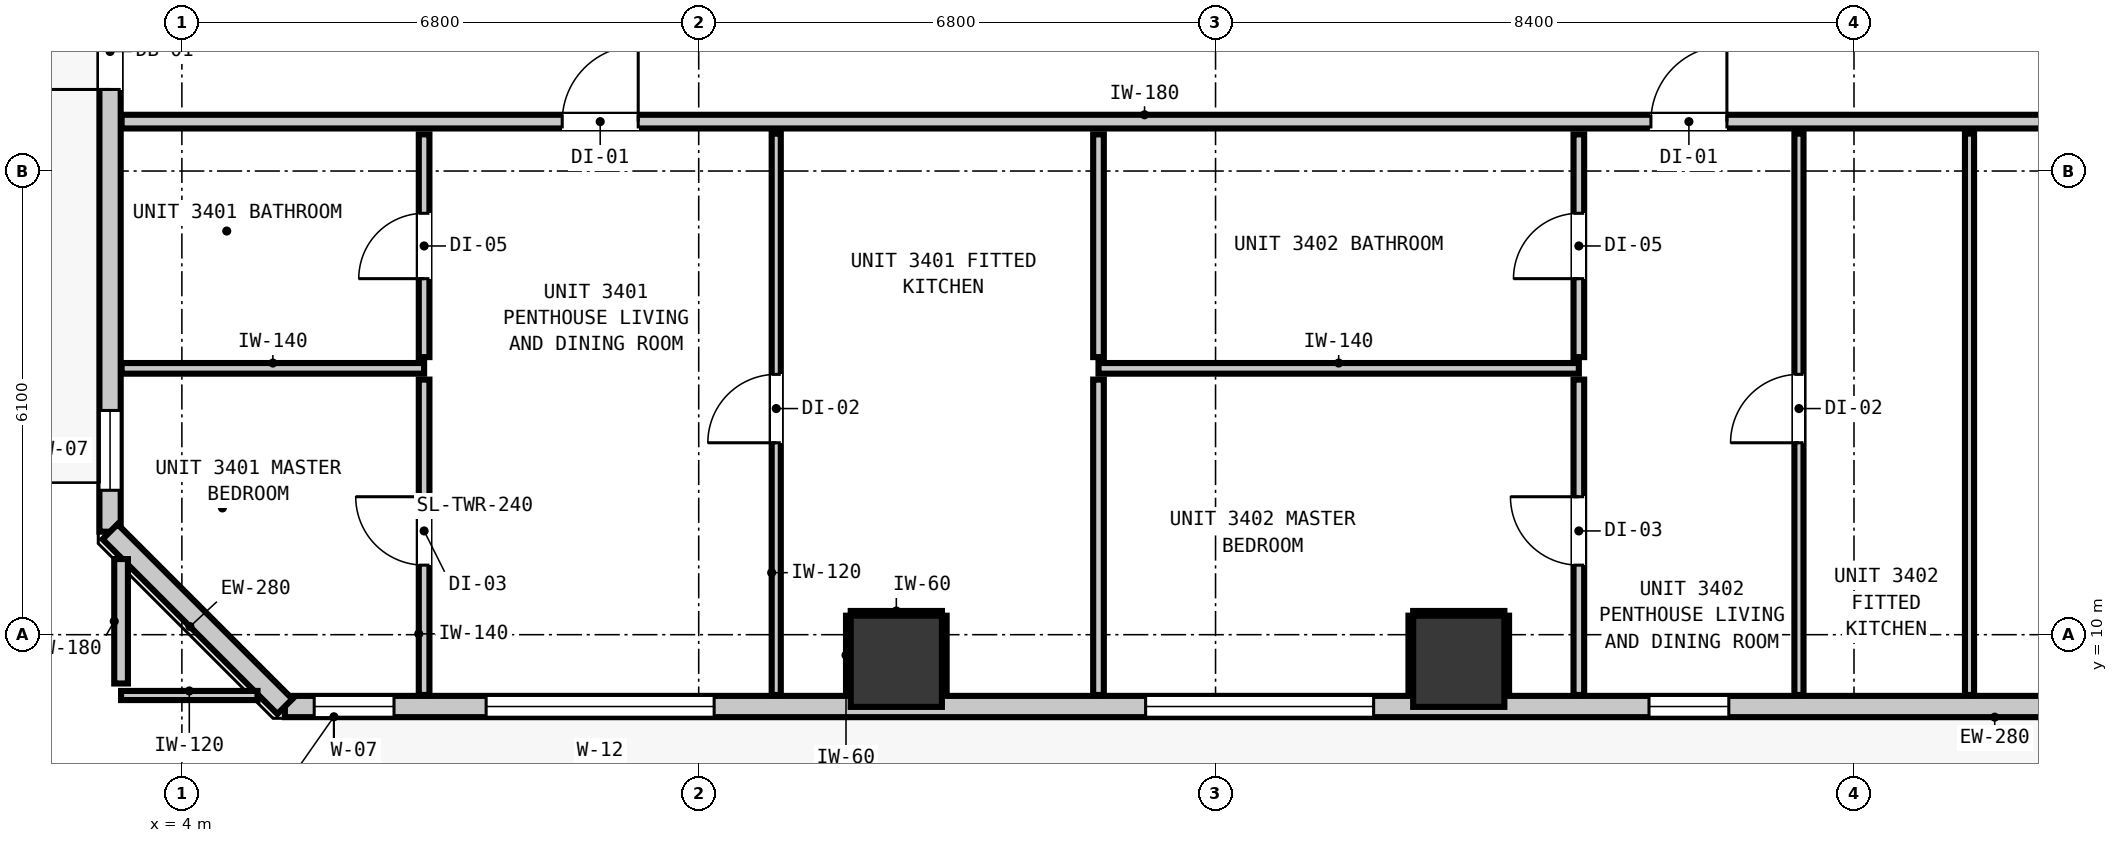
"""IFC4 building model, lengths in metres.
Left out: names, types, materials, properties, quantities, classifications, styles, units other than length and angle.
Written with IfcOpenShell. Run it as: python <this file> out.ifc"""

import sys

from ifc_helpers import new_model, si_unit, direction, frame, frame_2d, origin, origin_2d, place, context, subcontext, project, spatial, rectangle, extrude, element, fill, save


model = new_model("IFC4")
c1 = context("Model", 3, precision=1e-05, world=origin(), true_north=direction((0.0, 1.0)))
c2 = subcontext(c1, "Body", "Model", "MODEL_VIEW")
j1 = project(units=[si_unit("LENGTHUNIT", "METRE"), si_unit("PLANEANGLEUNIT", "RADIAN")], contexts=[c1])
p1 = place(None, origin())
s1 = spatial("IfcSite", under=j1, at=p1, CompositionType="ELEMENT")
p2 = place(p1, origin())
s2 = spatial("IfcBuilding", under=s1, at=p2, CompositionType="ELEMENT")
p3 = place(p2, frame((0.0, 0.0, 119.36)))
s3 = spatial("IfcBuildingStorey", under=s2, at=p3, CompositionType="ELEMENT", Elevation=119.36)
for number, where, z_axis, x_axis in (
    (1, (13.4, 9.65, 0.0), (0.0, 0.0, 1.0), (1.0, 0.0, 0.0)),
    (2, (20.8, 9.65, 0.0), (0.0, 0.0, 1.0), (1.0, 0.0, 0.0)),
):
    element("IfcColumn", number, at=place(p3, frame(where, z_axis=z_axis, x_axis=x_axis)), inside=s3, PredefinedType="COLUMN", context=c2, shape_type="SweptSolid", body=[
        extrude(rectangle(XDim=1.2, YDim=1.2, at=origin_2d()), origin(), (0.0, 0.0, 1.0), 3.32),
    ])
p4 = place(p3, frame((3.055, 11.355, 0.0), z_axis=(0.0, 0.0, 1.0), x_axis=(0.0, 1.0, 0.0)))
e3 = element("IfcWall", 3, at=p4, inside=s3, PredefinedType="STANDARD", context=c2, shape_type="SweptSolid", body=[
    extrude(rectangle(XDim=32.29, YDim=0.28, at=frame_2d((16.145, 0.0))), origin(), (0.0, 0.0, 1.0), 3.08),
])
p5 = place(p4, frame((5.818, 0.0, 0.0)))
e4 = element("IfcOpeningElement", 4, at=p5, cuts=e3, PredefinedType="OPENING", context=c2, shape_type="SweptSolid", body=[
    extrude(rectangle(XDim=1.0, YDim=2.15, at=frame_2d((0.5, 1.075))), frame((0.0, 0.15, 0.0), z_axis=(0.0, -1.0, 0.0), x_axis=(1.0, 0.0, 0.0)), (0.0, 0.0, 1.0), 0.3),
])
p6 = place(p4, frame((0.545, 0.0, 0.85)))
e5 = element("IfcOpeningElement", 5, at=p6, cuts=e3, PredefinedType="OPENING", context=c2, shape_type="SweptSolid", body=[
    extrude(rectangle(XDim=1.05, YDim=1.65, at=frame_2d((0.525, 0.825))), frame((0.0, 0.15, 0.0), z_axis=(0.0, -1.0, 0.0), x_axis=(1.0, 0.0, 0.0)), (0.0, 0.0, 1.0), 0.3),
])
p7 = place(p4, frame((13.495, 0.0, 0.85)))
e6 = element("IfcOpeningElement", 6, at=p7, cuts=e3, PredefinedType="OPENING", context=c2, shape_type="SweptSolid", body=[
    extrude(rectangle(XDim=3.0, YDim=2.1, at=frame_2d((1.5, 1.05))), frame((0.0, 0.15, 0.0), z_axis=(0.0, -1.0, 0.0), x_axis=(1.0, 0.0, 0.0)), (0.0, 0.0, 1.0), 0.3),
])
p8 = place(p3, frame((40.445, 9.055, 0.0), z_axis=(0.0, 0.0, 1.0), x_axis=(-1.0, 0.0, 0.0)))
e7 = element("IfcWall", 7, at=p8, inside=s3, PredefinedType="STANDARD", context=c2, shape_type="SweptSolid", body=[
    extrude(rectangle(XDim=35.09, YDim=0.28, at=frame_2d((17.545, 0.0))), origin(), (0.0, 0.0, 1.0), 3.08),
])
p9 = place(p8, frame((0.904, 0.0, 0.0)))
e8 = element("IfcOpeningElement", 8, at=p9, cuts=e7, PredefinedType="OPENING", context=c2, shape_type="SweptSolid", body=[
    extrude(rectangle(XDim=1.0, YDim=2.15, at=frame_2d((0.5, 1.075))), frame((0.0, 0.15, 0.0), z_axis=(0.0, -1.0, 0.0), x_axis=(1.0, 0.0, 0.0)), (0.0, 0.0, 1.0), 0.3),
])
p10 = place(p8, frame((29.442, 0.0, 0.85)))
e9 = element("IfcOpeningElement", 9, at=p10, cuts=e7, PredefinedType="OPENING", context=c2, shape_type="SweptSolid", body=[
    extrude(rectangle(XDim=3.0, YDim=2.1, at=frame_2d((1.5, 1.05))), frame((0.0, 0.15, 0.0), z_axis=(0.0, -1.0, 0.0), x_axis=(1.0, 0.0, 0.0)), (0.0, 0.0, 1.0), 0.3),
])
p11 = place(p8, frame((33.654, 0.0, 0.85)))
e10 = element("IfcOpeningElement", 10, at=p11, cuts=e7, PredefinedType="OPENING", context=c2, shape_type="SweptSolid", body=[
    extrude(rectangle(XDim=1.05, YDim=1.65, at=frame_2d((0.525, 0.825))), frame((0.0, 0.15, 0.0), z_axis=(0.0, -1.0, 0.0), x_axis=(1.0, 0.0, 0.0)), (0.0, 0.0, 1.0), 0.3),
])
p12 = place(p8, frame((16.092, 0.0, 0.85)))
e11 = element("IfcOpeningElement", 11, at=p12, cuts=e7, PredefinedType="OPENING", context=c2, shape_type="SweptSolid", body=[
    extrude(rectangle(XDim=1.05, YDim=1.65, at=frame_2d((0.525, 0.825))), frame((0.0, 0.15, 0.0), z_axis=(0.0, -1.0, 0.0), x_axis=(1.0, 0.0, 0.0)), (0.0, 0.0, 1.0), 0.3),
])
p13 = place(p8, frame((20.765, 0.0, 0.85)))
e12 = element("IfcOpeningElement", 12, at=p13, cuts=e7, PredefinedType="OPENING", context=c2, shape_type="SweptSolid", body=[
    extrude(rectangle(XDim=3.0, YDim=2.1, at=frame_2d((1.5, 1.05))), frame((0.0, 0.15, 0.0), z_axis=(0.0, -1.0, 0.0), x_axis=(1.0, 0.0, 0.0)), (0.0, 0.0, 1.0), 0.3),
])
p14 = place(p8, frame((6.095, 0.0, 0.85)))
e13 = element("IfcOpeningElement", 13, at=p14, cuts=e7, PredefinedType="OPENING", context=c2, shape_type="SweptSolid", body=[
    extrude(rectangle(XDim=3.0, YDim=2.1, at=frame_2d((1.5, 1.05))), frame((0.0, 0.15, 0.0), z_axis=(0.0, -1.0, 0.0), x_axis=(1.0, 0.0, 0.0)), (0.0, 0.0, 1.0), 0.3),
])
p15 = place(p3, frame((5.355, 9.055, 0.0), z_axis=(0.0, 0.0, 1.0), x_axis=(-0.707106781187, 0.707106781187, 0.0)))
e14 = element("IfcWall", 14, at=p15, inside=s3, PredefinedType="STANDARD", context=c2, shape_type="SweptSolid", body=[
    extrude(rectangle(XDim=3.253, YDim=0.28, at=frame_2d((1.626, 0.0))), origin(), (0.0, 0.0, 1.0), 3.08),
])
p16 = place(p3, frame((3.207, 16.75, 0.0), z_axis=(0.0, 0.0, 1.0), x_axis=(1.0, 0.0, 0.0)))
e15 = element("IfcWall", 15, at=p16, inside=s3, PredefinedType="PARTITIONING", context=c2, shape_type="SweptSolid", body=[
    extrude(rectangle(XDim=39.386, YDim=0.18, at=frame_2d((19.693, 0.0))), origin(), (0.0, 0.0, 1.0), 3.08),
])
p17 = place(p16, frame((5.797, 0.0, 0.0)))
e16 = element("IfcOpeningElement", 16, at=p17, cuts=e15, PredefinedType="OPENING", context=c2, shape_type="SweptSolid", body=[
    extrude(rectangle(XDim=1.0, YDim=2.15, at=frame_2d((0.5, 1.075))), frame((0.0, 0.1, 0.0), z_axis=(0.0, -1.0, 0.0), x_axis=(1.0, 0.0, 0.0)), (0.0, 0.0, 1.0), 0.2),
])
p18 = place(p16, frame((20.121, 0.0, 0.0)))
e17 = element("IfcOpeningElement", 17, at=p18, cuts=e15, PredefinedType="OPENING", context=c2, shape_type="SweptSolid", body=[
    extrude(rectangle(XDim=1.0, YDim=2.15, at=frame_2d((0.5, 1.075))), frame((0.0, 0.1, 0.0), z_axis=(0.0, -1.0, 0.0), x_axis=(1.0, 0.0, 0.0)), (0.0, 0.0, 1.0), 0.2),
])
p19 = place(p16, frame((31.379, 0.0, 0.0)))
e18 = element("IfcOpeningElement", 18, at=p19, cuts=e15, PredefinedType="OPENING", context=c2, shape_type="SweptSolid", body=[
    extrude(rectangle(XDim=0.9, YDim=2.1, at=frame_2d((0.45, 1.05))), frame((0.0, 0.1, 0.0), z_axis=(0.0, -1.0, 0.0), x_axis=(1.0, 0.0, 0.0)), (0.0, 0.0, 1.0), 0.2),
])
p20 = place(p3, frame((3.207, 13.504, 0.0), z_axis=(0.0, 0.0, 1.0), x_axis=(1.0, 0.0, 0.0)))
e19 = element("IfcWall", 19, at=p20, inside=s3, PredefinedType="PARTITIONING", context=c2, shape_type="SweptSolid", body=[
    extrude(rectangle(XDim=3.98, YDim=0.14, at=frame_2d((1.99, 0.0))), origin(), (0.0, 0.0, 1.0), 3.08),
])
p21 = place(p3, frame((16.06, 13.504, 0.0), z_axis=(0.0, 0.0, 1.0), x_axis=(1.0, 0.0, 0.0)))
e20 = element("IfcWall", 20, at=p21, inside=s3, PredefinedType="PARTITIONING", context=c2, shape_type="SweptSolid", body=[
    extrude(rectangle(XDim=6.32, YDim=0.14, at=frame_2d((3.16, 0.0))), origin(), (0.0, 0.0, 1.0), 3.08),
])
p22 = place(p3, frame((3.2, 9.2, 0.0), z_axis=(0.0, 0.0, 1.0), x_axis=(1.0, 0.0, 0.0)))
e21 = element("IfcWall", 21, at=p22, inside=s3, PredefinedType="PARTITIONING", context=c2, shape_type="SweptSolid", body=[
    extrude(rectangle(XDim=1.795, YDim=0.12, at=frame_2d((0.897, 0.0))), origin(), (0.0, 0.0, 1.0), 3.08),
])
p23 = place(p3, frame((3.2, 9.358, 0.0), z_axis=(0.0, 0.0, 1.0), x_axis=(0.0, 1.0, 0.0)))
e22 = element("IfcWall", 22, at=p23, inside=s3, PredefinedType="PARTITIONING", context=c2, shape_type="SweptSolid", body=[
    extrude(rectangle(XDim=1.637, YDim=0.18, at=frame_2d((0.819, 0.0))), origin(), (0.0, 0.0, 1.0), 3.08),
])
p24 = place(p3, frame((7.187, 9.207, 0.0), z_axis=(0.0, 0.0, 1.0), x_axis=(0.0, 1.0, 0.0)))
e23 = element("IfcWall", 23, at=p24, inside=s3, PredefinedType="PARTITIONING", context=c2, shape_type="SweptSolid", body=[
    extrude(rectangle(XDim=4.149, YDim=0.14, at=frame_2d((2.074, 0.0))), origin(), (0.0, 0.0, 1.0), 3.08),
])
p25 = place(p24, frame((1.708, 0.0, 0.0)))
e24 = element("IfcOpeningElement", 24, at=p25, cuts=e23, PredefinedType="OPENING", context=c2, shape_type="SweptSolid", body=[
    extrude(rectangle(XDim=0.9, YDim=2.1, at=frame_2d((0.45, 1.05))), frame((0.0, 0.08, 0.0), z_axis=(0.0, -1.0, 0.0), x_axis=(1.0, 0.0, 0.0)), (0.0, 0.0, 1.0), 0.16),
])
p26 = place(p3, frame((7.187, 13.652, 0.0), z_axis=(0.0, 0.0, 1.0), x_axis=(0.0, 1.0, 0.0)))
e25 = element("IfcWall", 25, at=p26, inside=s3, PredefinedType="PARTITIONING", context=c2, shape_type="SweptSolid", body=[
    extrude(rectangle(XDim=2.93, YDim=0.14, at=frame_2d((1.465, 0.0))), origin(), (0.0, 0.0, 1.0), 3.08),
])
p27 = place(p26, frame((1.032, 0.0, 0.0)))
e26 = element("IfcOpeningElement", 26, at=p27, cuts=e25, PredefinedType="OPENING", context=c2, shape_type="SweptSolid", body=[
    extrude(rectangle(XDim=0.86, YDim=2.02, at=frame_2d((0.43, 1.01))), frame((0.0, 0.08, 0.0), z_axis=(0.0, -1.0, 0.0), x_axis=(1.0, 0.0, 0.0)), (0.0, 0.0, 1.0), 0.16),
])
p28 = place(p3, frame((16.06, 9.207, 0.0), z_axis=(0.0, 0.0, 1.0), x_axis=(0.0, 1.0, 0.0)))
e27 = element("IfcWall", 27, at=p28, inside=s3, PredefinedType="PARTITIONING", context=c2, shape_type="SweptSolid", body=[
    extrude(rectangle(XDim=4.149, YDim=0.14, at=frame_2d((2.074, 0.0))), origin(), (0.0, 0.0, 1.0), 3.08),
])
p29 = place(p3, frame((16.06, 13.652, 0.0), z_axis=(0.0, 0.0, 1.0), x_axis=(0.0, 1.0, 0.0)))
e28 = element("IfcWall", 28, at=p29, inside=s3, PredefinedType="PARTITIONING", context=c2, shape_type="SweptSolid", body=[
    extrude(rectangle(XDim=2.93, YDim=0.14, at=frame_2d((1.465, 0.0))), origin(), (0.0, 0.0, 1.0), 3.08),
])
p30 = place(p3, frame((22.38, 9.207, 0.0), z_axis=(0.0, 0.0, 1.0), x_axis=(0.0, 1.0, 0.0)))
e29 = element("IfcWall", 29, at=p30, inside=s3, PredefinedType="PARTITIONING", context=c2, shape_type="SweptSolid", body=[
    extrude(rectangle(XDim=4.149, YDim=0.14, at=frame_2d((2.074, 0.0))), origin(), (0.0, 0.0, 1.0), 3.08),
])
p31 = place(p30, frame((1.708, 0.0, 0.0)))
e30 = element("IfcOpeningElement", 30, at=p31, cuts=e29, PredefinedType="OPENING", context=c2, shape_type="SweptSolid", body=[
    extrude(rectangle(XDim=0.9, YDim=2.1, at=frame_2d((0.45, 1.05))), frame((0.0, 0.08, 0.0), z_axis=(0.0, -1.0, 0.0), x_axis=(1.0, 0.0, 0.0)), (0.0, 0.0, 1.0), 0.16),
])
p32 = place(p3, frame((22.38, 13.652, 0.0), z_axis=(0.0, 0.0, 1.0), x_axis=(0.0, 1.0, 0.0)))
e31 = element("IfcWall", 31, at=p32, inside=s3, PredefinedType="PARTITIONING", context=c2, shape_type="SweptSolid", body=[
    extrude(rectangle(XDim=2.93, YDim=0.14, at=frame_2d((1.465, 0.0))), origin(), (0.0, 0.0, 1.0), 3.08),
])
p33 = place(p32, frame((1.032, 0.0, 0.0)))
e32 = element("IfcOpeningElement", 32, at=p33, cuts=e31, PredefinedType="OPENING", context=c2, shape_type="SweptSolid", body=[
    extrude(rectangle(XDim=0.86, YDim=2.02, at=frame_2d((0.43, 1.01))), frame((0.0, 0.08, 0.0), z_axis=(0.0, -1.0, 0.0), x_axis=(1.0, 0.0, 0.0)), (0.0, 0.0, 1.0), 0.16),
])
p34 = place(p3, frame((11.82, 9.207, 0.0), z_axis=(0.0, 0.0, 1.0), x_axis=(0.0, 1.0, 0.0)))
e33 = element("IfcWall", 33, at=p34, inside=s3, PredefinedType="PARTITIONING", context=c2, shape_type="SweptSolid", body=[
    extrude(rectangle(XDim=7.385, YDim=0.12, at=frame_2d((3.692, 0.0))), origin(), (0.0, 0.0, 1.0), 3.08),
])
p35 = place(p34, frame((3.318, 0.0, 0.0)))
e34 = element("IfcOpeningElement", 34, at=p35, cuts=e33, PredefinedType="OPENING", context=c2, shape_type="SweptSolid", body=[
    extrude(rectangle(XDim=0.9, YDim=2.1, at=frame_2d((0.45, 1.05))), frame((0.0, 0.07, 0.0), z_axis=(0.0, -1.0, 0.0), x_axis=(1.0, 0.0, 0.0)), (0.0, 0.0, 1.0), 0.14),
])
p36 = place(p3, frame((25.276, 9.207, 0.0), z_axis=(0.0, 0.0, 1.0), x_axis=(0.0, 1.0, 0.0)))
e35 = element("IfcWall", 35, at=p36, inside=s3, PredefinedType="PARTITIONING", context=c2, shape_type="SweptSolid", body=[
    extrude(rectangle(XDim=7.385, YDim=0.12, at=frame_2d((3.692, 0.0))), origin(), (0.0, 0.0, 1.0), 3.08),
])
p37 = place(p36, frame((3.318, 0.0, 0.0)))
e36 = element("IfcOpeningElement", 36, at=p37, cuts=e35, PredefinedType="OPENING", context=c2, shape_type="SweptSolid", body=[
    extrude(rectangle(XDim=0.9, YDim=2.1, at=frame_2d((0.45, 1.05))), frame((0.0, 0.07, 0.0), z_axis=(0.0, -1.0, 0.0), x_axis=(1.0, 0.0, 0.0)), (0.0, 0.0, 1.0), 0.14),
])
p38 = place(p3, frame((27.52, 9.207, 0.0), z_axis=(0.0, 0.0, 1.0), x_axis=(0.0, 1.0, 0.0)))
e37 = element("IfcWall", 37, at=p38, inside=s3, PredefinedType="PARTITIONING", context=c2, shape_type="SweptSolid", body=[
    extrude(rectangle(XDim=7.385, YDim=0.12, at=frame_2d((3.692, 0.0))), origin(), (0.0, 0.0, 1.0), 3.08),
])
p39 = place(p3, frame((12.8, 10.282, 0.0), z_axis=(0.0, 0.0, 1.0), x_axis=(1.0, 0.0, 0.0)))
e38 = element("IfcWall", 38, at=p39, inside=s3, PredefinedType="PARTITIONING", context=c2, shape_type="SweptSolid", body=[
    extrude(rectangle(XDim=1.2, YDim=0.06, at=frame_2d((0.6, 0.0))), origin(), (0.0, 0.0, 1.0), 1.45),
])
for number, where, z_axis, x_axis in (
    (39, (12.768, 9.21, 0.0), (0.0, 0.0, 1.0), (0.0, 1.0, 0.0)),
    (40, (14.032, 9.21, 0.0), (0.0, 0.0, 1.0), (0.0, 1.0, 0.0)),
):
    element("IfcWall", number, at=place(p3, frame(where, z_axis=z_axis, x_axis=x_axis)), inside=s3, PredefinedType="PARTITIONING", context=c2, shape_type="SweptSolid", body=[
        extrude(rectangle(XDim=1.04, YDim=0.06, at=frame_2d((0.52, 0.0))), origin(), (0.0, 0.0, 1.0), 1.45),
    ])
p40 = place(p3, frame((20.2, 10.282, 0.0), z_axis=(0.0, 0.0, 1.0), x_axis=(1.0, 0.0, 0.0)))
e41 = element("IfcWall", 41, at=p40, inside=s3, PredefinedType="PARTITIONING", context=c2, shape_type="SweptSolid", body=[
    extrude(rectangle(XDim=1.2, YDim=0.06, at=frame_2d((0.6, 0.0))), origin(), (0.0, 0.0, 1.0), 1.45),
])
for number, where, z_axis, x_axis in (
    (42, (20.168, 9.21, 0.0), (0.0, 0.0, 1.0), (0.0, 1.0, 0.0)),
    (43, (21.432, 9.21, 0.0), (0.0, 0.0, 1.0), (0.0, 1.0, 0.0)),
):
    element("IfcWall", number, at=place(p3, frame(where, z_axis=z_axis, x_axis=x_axis)), inside=s3, PredefinedType="PARTITIONING", context=c2, shape_type="SweptSolid", body=[
        extrude(rectangle(XDim=1.04, YDim=0.06, at=frame_2d((0.52, 0.0))), origin(), (0.0, 0.0, 1.0), 1.45),
    ])
p41 = place(p5, origin())
e44 = element("IfcDoor", 44, at=p41, inside=s3, OperationType="SINGLE_SWING_LEFT", PredefinedType="DOOR", context=c2, shape_type="SweptSolid", body=[
    extrude(rectangle(XDim=1.0, YDim=2.15, at=frame_2d((0.5, 1.075))), frame((0.0, 0.025, 0.0), z_axis=(0.0, -1.0, 0.0), x_axis=(1.0, 0.0, 0.0)), (0.0, 0.0, 1.0), 0.05),
])
fill(e4, e44)
p42 = place(p6, origin())
e45 = element("IfcWindow", 45, at=p42, inside=s3, PartitioningType="SINGLE_PANEL", PredefinedType="WINDOW", context=c2, shape_type="SweptSolid", body=[
    extrude(rectangle(XDim=1.05, YDim=1.65, at=frame_2d((0.525, 0.825))), frame((0.0, 0.03, 0.0), z_axis=(0.0, -1.0, 0.0), x_axis=(1.0, 0.0, 0.0)), (0.0, 0.0, 1.0), 0.06),
])
fill(e5, e45)
p43 = place(p10, origin())
e46 = element("IfcWindow", 46, at=p43, inside=s3, PartitioningType="SINGLE_PANEL", PredefinedType="WINDOW", context=c2, shape_type="SweptSolid", body=[
    extrude(rectangle(XDim=3.0, YDim=2.1, at=frame_2d((1.5, 1.05))), frame((0.0, 0.03, 0.0), z_axis=(0.0, -1.0, 0.0), x_axis=(1.0, 0.0, 0.0)), (0.0, 0.0, 1.0), 0.06),
])
fill(e9, e46)
p44 = place(p11, origin())
e47 = element("IfcWindow", 47, at=p44, inside=s3, PartitioningType="SINGLE_PANEL", PredefinedType="WINDOW", context=c2, shape_type="SweptSolid", body=[
    extrude(rectangle(XDim=1.05, YDim=1.65, at=frame_2d((0.525, 0.825))), frame((0.0, 0.03, 0.0), z_axis=(0.0, -1.0, 0.0), x_axis=(1.0, 0.0, 0.0)), (0.0, 0.0, 1.0), 0.06),
])
fill(e10, e47)
p45 = place(p12, origin())
e48 = element("IfcWindow", 48, at=p45, inside=s3, PartitioningType="SINGLE_PANEL", PredefinedType="WINDOW", context=c2, shape_type="SweptSolid", body=[
    extrude(rectangle(XDim=1.05, YDim=1.65, at=frame_2d((0.525, 0.825))), frame((0.0, 0.03, 0.0), z_axis=(0.0, -1.0, 0.0), x_axis=(1.0, 0.0, 0.0)), (0.0, 0.0, 1.0), 0.06),
])
fill(e11, e48)
p46 = place(p13, origin())
e49 = element("IfcWindow", 49, at=p46, inside=s3, PartitioningType="SINGLE_PANEL", PredefinedType="WINDOW", context=c2, shape_type="SweptSolid", body=[
    extrude(rectangle(XDim=3.0, YDim=2.1, at=frame_2d((1.5, 1.05))), frame((0.0, 0.03, 0.0), z_axis=(0.0, -1.0, 0.0), x_axis=(1.0, 0.0, 0.0)), (0.0, 0.0, 1.0), 0.06),
])
fill(e12, e49)
p47 = place(p17, origin())
e50 = element("IfcDoor", 50, at=p47, inside=s3, OperationType="SINGLE_SWING_RIGHT", PredefinedType="DOOR", context=c2, shape_type="SweptSolid", body=[
    extrude(rectangle(XDim=1.0, YDim=2.15, at=frame_2d((0.5, 1.075))), frame((0.0, 0.025, 0.0), z_axis=(0.0, -1.0, 0.0), x_axis=(1.0, 0.0, 0.0)), (0.0, 0.0, 1.0), 0.05),
])
fill(e16, e50)
p48 = place(p27, origin())
e51 = element("IfcDoor", 51, at=p48, inside=s3, OperationType="SINGLE_SWING_LEFT", PredefinedType="DOOR", context=c2, shape_type="SweptSolid", body=[
    extrude(rectangle(XDim=0.86, YDim=2.02, at=frame_2d((0.43, 1.01))), frame((0.0, 0.025, 0.0), z_axis=(0.0, -1.0, 0.0), x_axis=(1.0, 0.0, 0.0)), (0.0, 0.0, 1.0), 0.05),
])
fill(e26, e51)
p49 = place(p25, origin())
e52 = element("IfcDoor", 52, at=p49, inside=s3, OperationType="SINGLE_SWING_RIGHT", PredefinedType="DOOR", context=c2, shape_type="SweptSolid", body=[
    extrude(rectangle(XDim=0.9, YDim=2.1, at=frame_2d((0.45, 1.05))), frame((0.0, 0.025, 0.0), z_axis=(0.0, -1.0, 0.0), x_axis=(1.0, 0.0, 0.0)), (0.0, 0.0, 1.0), 0.05),
])
fill(e24, e52)
p50 = place(p35, origin())
e53 = element("IfcDoor", 53, at=p50, inside=s3, OperationType="SINGLE_SWING_LEFT", PredefinedType="DOOR", context=c2, shape_type="SweptSolid", body=[
    extrude(rectangle(XDim=0.9, YDim=2.1, at=frame_2d((0.45, 1.05))), frame((0.0, 0.025, 0.0), z_axis=(0.0, -1.0, 0.0), x_axis=(1.0, 0.0, 0.0)), (0.0, 0.0, 1.0), 0.05),
])
fill(e34, e53)
p51 = place(p18, origin())
e54 = element("IfcDoor", 54, at=p51, inside=s3, OperationType="SINGLE_SWING_RIGHT", PredefinedType="DOOR", context=c2, shape_type="SweptSolid", body=[
    extrude(rectangle(XDim=1.0, YDim=2.15, at=frame_2d((0.5, 1.075))), frame((0.0, 0.025, 0.0), z_axis=(0.0, -1.0, 0.0), x_axis=(1.0, 0.0, 0.0)), (0.0, 0.0, 1.0), 0.05),
])
fill(e17, e54)
p52 = place(p33, origin())
e55 = element("IfcDoor", 55, at=p52, inside=s3, OperationType="SINGLE_SWING_LEFT", PredefinedType="DOOR", context=c2, shape_type="SweptSolid", body=[
    extrude(rectangle(XDim=0.86, YDim=2.02, at=frame_2d((0.43, 1.01))), frame((0.0, 0.025, 0.0), z_axis=(0.0, -1.0, 0.0), x_axis=(1.0, 0.0, 0.0)), (0.0, 0.0, 1.0), 0.05),
])
fill(e32, e55)
p53 = place(p31, origin())
e56 = element("IfcDoor", 56, at=p53, inside=s3, OperationType="SINGLE_SWING_RIGHT", PredefinedType="DOOR", context=c2, shape_type="SweptSolid", body=[
    extrude(rectangle(XDim=0.9, YDim=2.1, at=frame_2d((0.45, 1.05))), frame((0.0, 0.025, 0.0), z_axis=(0.0, -1.0, 0.0), x_axis=(1.0, 0.0, 0.0)), (0.0, 0.0, 1.0), 0.05),
])
fill(e30, e56)
p54 = place(p37, origin())
e57 = element("IfcDoor", 57, at=p54, inside=s3, OperationType="SINGLE_SWING_LEFT", PredefinedType="DOOR", context=c2, shape_type="SweptSolid", body=[
    extrude(rectangle(XDim=0.9, YDim=2.1, at=frame_2d((0.45, 1.05))), frame((0.0, 0.025, 0.0), z_axis=(0.0, -1.0, 0.0), x_axis=(1.0, 0.0, 0.0)), (0.0, 0.0, 1.0), 0.05),
])
fill(e36, e57)
save(model, sys.argv[1])
